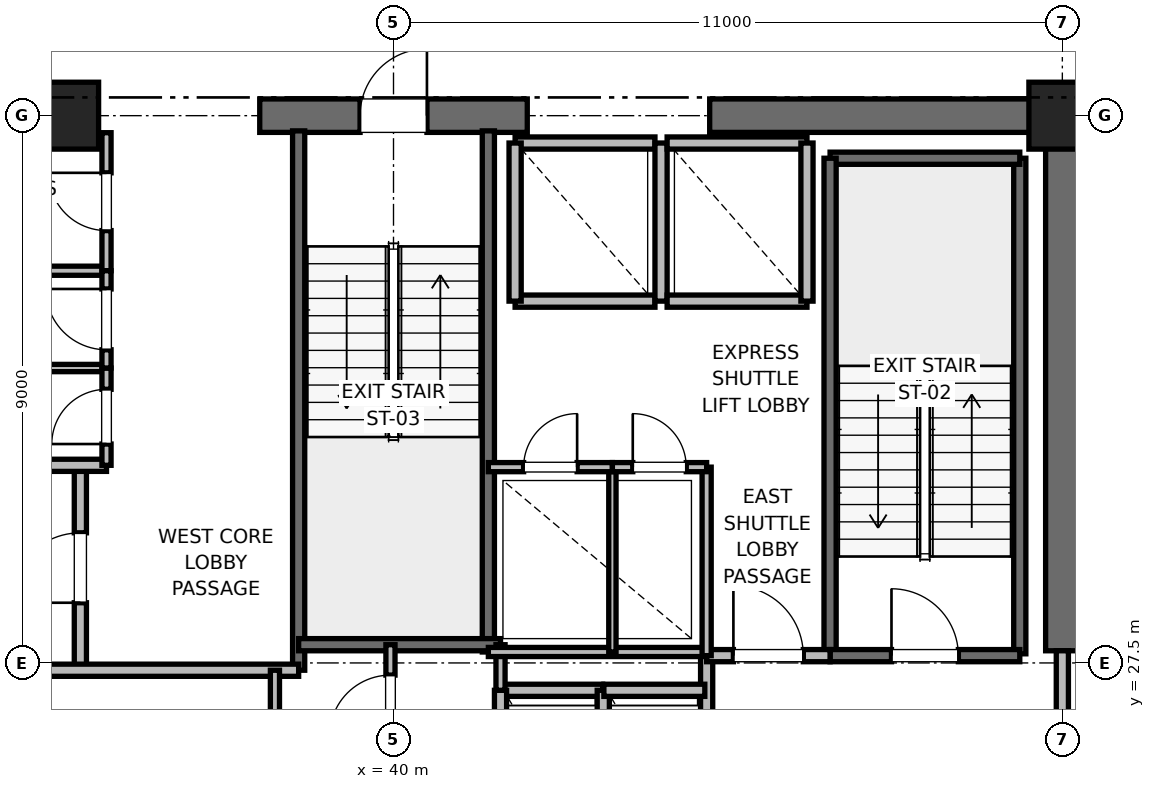
"""IFC4 building model, lengths in metres.
Left out: names, types, materials, properties, quantities, classifications, styles, units other than length and angle.
Written with IfcOpenShell. Run it as: python <this file> out.ifc"""

import sys

from ifc_helpers import new_model, si_unit, direction, frame, frame_2d, origin, origin_2d, place, context, subcontext, project, spatial, rectangle, extrude, element, fill, save


model = new_model("IFC4")
c1 = context("Model", 3, precision=1e-05, world=origin(), true_north=direction((0.0, 1.0)))
c2 = subcontext(c1, "Body", "Model", "MODEL_VIEW")
j1 = project(units=[si_unit("LENGTHUNIT", "METRE"), si_unit("PLANEANGLEUNIT", "RADIAN")], contexts=[c1])
p1 = place(None, origin())
s1 = spatial("IfcSite", under=j1, at=p1, CompositionType="ELEMENT")
p2 = place(p1, origin())
s2 = spatial("IfcBuilding", under=s1, at=p2, CompositionType="ELEMENT")
p3 = place(p2, frame((0.0, 0.0, 136.4)))
s3 = spatial("IfcBuildingStorey", under=s2, at=p3, CompositionType="ELEMENT", Elevation=136.4)
for number, where, z_axis, x_axis in (
    (1, (51.0, 36.5, 0.0), (0.0, 0.0, 1.0), (1.0, 0.0, 0.0)),
    (2, (34.6, 36.5, 0.0), (0.0, 0.0, 1.0), (1.0, 0.0, 0.0)),
):
    element("IfcColumn", number, at=place(p3, frame(where, z_axis=z_axis, x_axis=x_axis)), inside=s3, PredefinedType="PILASTER", context=c2, shape_type="SweptSolid", body=[
        extrude(rectangle(XDim=1.1, YDim=1.1, at=origin_2d()), origin(), (0.0, 0.0, 1.0), 4.0),
    ])
p4 = place(p3, frame((29.0, 36.5, 0.0), z_axis=(0.0, 0.0, 1.0), x_axis=(1.0, 0.0, 0.0)))
e3 = element("IfcWall", 3, at=p4, inside=s3, PredefinedType="SHEAR", context=c2, shape_type="SweptSolid", body=[
    extrude(rectangle(XDim=5.8, YDim=0.55, at=frame_2d((2.9, 0.0))), origin(), (0.0, 0.0, 1.0), 3.775),
])
p5 = place(p3, frame((37.8, 36.5, 0.0), z_axis=(0.0, 0.0, 1.0), x_axis=(1.0, 0.0, 0.0)))
e4 = element("IfcWall", 4, at=p5, inside=s3, PredefinedType="SHEAR", context=c2, shape_type="SweptSolid", body=[
    extrude(rectangle(XDim=4.4, YDim=0.55, at=frame_2d((2.2, 0.0))), origin(), (0.0, 0.0, 1.0), 3.775),
])
p6 = place(p5, frame((1.65, 0.0, 0.0)))
e5 = element("IfcOpeningElement", 5, at=p6, cuts=e4, PredefinedType="OPENING", context=c2, shape_type="SweptSolid", body=[
    extrude(rectangle(XDim=1.1, YDim=2.15, at=frame_2d((0.55, 1.075))), frame((0.0, 0.275, 0.0), z_axis=(0.0, -1.0, 0.0), x_axis=(1.0, 0.0, 0.0)), (0.0, 0.0, 1.0), 0.55),
])
p7 = place(p3, frame((45.2, 36.5, 0.0), z_axis=(0.0, 0.0, 1.0), x_axis=(1.0, 0.0, 0.0)))
e6 = element("IfcWall", 6, at=p7, inside=s3, PredefinedType="SHEAR", context=c2, shape_type="SweptSolid", body=[
    extrude(rectangle(XDim=5.8, YDim=0.55, at=frame_2d((2.9, 0.0))), origin(), (0.0, 0.0, 1.0), 3.775),
])
p8 = place(p3, frame((51.0, 27.7, 0.0), z_axis=(0.0, 0.0, 1.0), x_axis=(0.0, 1.0, 0.0)))
e7 = element("IfcWall", 7, at=p8, inside=s3, PredefinedType="SHEAR", context=c2, shape_type="SweptSolid", body=[
    extrude(rectangle(XDim=8.8, YDim=0.55, at=frame_2d((4.4, 0.0))), origin(), (0.0, 0.0, 1.0), 3.775),
])
p9 = place(p3, frame((50.3, 27.65, 0.0), z_axis=(0.0, 0.0, 1.0), x_axis=(0.0, 1.0, 0.0)))
e8 = element("IfcWall", 8, at=p9, inside=s3, PredefinedType="SOLIDWALL", context=c2, shape_type="SweptSolid", body=[
    extrude(rectangle(XDim=8.15, YDim=0.2, at=frame_2d((4.075, 0.0))), origin(), (0.0, 0.0, 1.0), 3.775),
])
p10 = place(p3, frame((47.18, 35.8, 0.0), z_axis=(0.0, 0.0, 1.0), x_axis=(1.0, 0.0, 0.0)))
e9 = element("IfcWall", 9, at=p10, inside=s3, PredefinedType="SOLIDWALL", context=c2, shape_type="SweptSolid", body=[
    extrude(rectangle(XDim=3.12, YDim=0.2, at=frame_2d((1.56, 0.0))), origin(), (0.0, 0.0, 1.0), 3.775),
])
p11 = place(p3, frame((47.18, 27.62, 0.0), z_axis=(0.0, 0.0, 1.0), x_axis=(0.0, 1.0, 0.0)))
e10 = element("IfcWall", 10, at=p11, inside=s3, PredefinedType="SOLIDWALL", context=c2, shape_type="SweptSolid", body=[
    extrude(rectangle(XDim=8.18, YDim=0.2, at=frame_2d((4.09, 0.0))), origin(), (0.0, 0.0, 1.0), 3.775),
])
p12 = place(p3, frame((47.18, 27.62, 0.0), z_axis=(0.0, 0.0, 1.0), x_axis=(1.0, 0.0, 0.0)))
e11 = element("IfcWall", 11, at=p12, inside=s3, PredefinedType="SOLIDWALL", context=c2, shape_type="SweptSolid", body=[
    extrude(rectangle(XDim=3.12, YDim=0.2, at=frame_2d((1.56, 0.0))), origin(), (0.0, 0.0, 1.0), 3.775),
])
p13 = place(p12, frame((1.01, 0.0, 0.0)))
e12 = element("IfcOpeningElement", 12, at=p13, cuts=e11, PredefinedType="OPENING", context=c2, shape_type="SweptSolid", body=[
    extrude(rectangle(XDim=1.1, YDim=2.15, at=frame_2d((0.55, 1.075))), frame((0.0, 0.1, 0.0), z_axis=(0.0, -1.0, 0.0), x_axis=(1.0, 0.0, 0.0)), (0.0, 0.0, 1.0), 0.2),
])
p14 = place(p3, frame((38.44, 27.38, 0.0), z_axis=(0.0, 0.0, 1.0), x_axis=(0.0, 1.0, 0.0)))
e13 = element("IfcWall", 13, at=p14, inside=s3, PredefinedType="SOLIDWALL", context=c2, shape_type="SweptSolid", body=[
    extrude(rectangle(XDim=8.87, YDim=0.2, at=frame_2d((4.435, 0.0))), origin(), (0.0, 0.0, 1.0), 3.775),
])
p15 = place(p3, frame((41.56, 27.68, 0.0), z_axis=(0.0, 0.0, 1.0), x_axis=(0.0, 1.0, 0.0)))
e14 = element("IfcWall", 14, at=p15, inside=s3, PredefinedType="SOLIDWALL", context=c2, shape_type="SweptSolid", body=[
    extrude(rectangle(XDim=8.57, YDim=0.2, at=frame_2d((4.285, 0.0))), origin(), (0.0, 0.0, 1.0), 3.775),
])
p16 = place(p3, frame((38.44, 27.8, 0.0), z_axis=(0.0, 0.0, 1.0), x_axis=(1.0, 0.0, 0.0)))
e15 = element("IfcWall", 15, at=p16, inside=s3, PredefinedType="SOLIDWALL", context=c2, shape_type="SweptSolid", body=[
    extrude(rectangle(XDim=3.32, YDim=0.2, at=frame_2d((1.66, 0.0))), origin(), (0.0, 0.0, 1.0), 3.775),
])
p17 = place(p3, frame((34.85, 27.38, 0.0), z_axis=(0.0, 0.0, 1.0), x_axis=(0.0, 1.0, 0.0)))
e16 = element("IfcWall", 16, at=p17, inside=s3, PredefinedType="PARTITIONING", context=c2, shape_type="SweptSolid", body=[
    extrude(rectangle(XDim=3.37, YDim=0.2, at=frame_2d((1.685, 0.0))), origin(), (0.0, 0.0, 1.0), 3.775),
])
p18 = place(p17, frame((1.11, 0.0, 0.0)))
e17 = element("IfcOpeningElement", 17, at=p18, cuts=e16, PredefinedType="OPENING", context=c2, shape_type="SweptSolid", body=[
    extrude(rectangle(XDim=1.15, YDim=2.2, at=frame_2d((0.575, 1.1))), frame((0.0, 0.1, 0.0), z_axis=(0.0, -1.0, 0.0), x_axis=(1.0, 0.0, 0.0)), (0.0, 0.0, 1.0), 0.2),
])
p19 = place(p3, frame((32.82, 27.38, 0.0), z_axis=(0.0, 0.0, 1.0), x_axis=(1.0, 0.0, 0.0)))
e18 = element("IfcWall", 18, at=p19, inside=s3, PredefinedType="PARTITIONING", context=c2, shape_type="SweptSolid", body=[
    extrude(rectangle(XDim=5.62, YDim=0.2, at=frame_2d((2.81, 0.0))), origin(), (0.0, 0.0, 1.0), 3.775),
])
p20 = place(p3, frame((32.15, 30.75, 0.0), z_axis=(0.0, 0.0, 1.0), x_axis=(1.0, 0.0, 0.0)))
e19 = element("IfcWall", 19, at=p20, inside=s3, PredefinedType="PARTITIONING", context=c2, shape_type="SweptSolid", body=[
    extrude(rectangle(XDim=3.13, YDim=0.2, at=frame_2d((1.565, 0.0))), origin(), (0.0, 0.0, 1.0), 3.775),
])
p21 = place(p3, frame((45.15, 24.25, 0.0), z_axis=(0.0, 0.0, 1.0), x_axis=(0.0, 1.0, 0.0)))
e20 = element("IfcWall", 20, at=p21, inside=s3, PredefinedType="PARTITIONING", context=c2, shape_type="SweptSolid", body=[
    extrude(rectangle(XDim=3.37, YDim=0.2, at=frame_2d((1.685, 0.0))), origin(), (0.0, 0.0, 1.0), 3.775),
])
p22 = place(p3, frame((45.15, 27.62, 0.0), z_axis=(0.0, 0.0, 1.0), x_axis=(1.0, 0.0, 0.0)))
e21 = element("IfcWall", 21, at=p22, inside=s3, PredefinedType="PARTITIONING", context=c2, shape_type="SweptSolid", body=[
    extrude(rectangle(XDim=2.03, YDim=0.2, at=frame_2d((1.015, 0.0))), origin(), (0.0, 0.0, 1.0), 3.775),
])
p23 = place(p22, frame((0.44, 0.0, 0.0)))
e22 = element("IfcOpeningElement", 22, at=p23, cuts=e21, PredefinedType="OPENING", context=c2, shape_type="SweptSolid", body=[
    extrude(rectangle(XDim=1.15, YDim=2.2, at=frame_2d((0.575, 1.1))), frame((0.0, 0.1, 0.0), z_axis=(0.0, -1.0, 0.0), x_axis=(1.0, 0.0, 0.0)), (0.0, 0.0, 1.0), 0.2),
])
p24 = place(p3, frame((51.0, 24.3, 0.0), z_axis=(0.0, 0.0, 1.0), x_axis=(0.0, 1.0, 0.0)))
e23 = element("IfcWall", 23, at=p24, inside=s3, PredefinedType="PARTITIONING", context=c2, shape_type="SweptSolid", body=[
    extrude(rectangle(XDim=3.4, YDim=0.2, at=frame_2d((1.7, 0.0))), origin(), (0.0, 0.0, 1.0), 2.755),
])
p25 = place(p24, frame((1.125, 0.0, 0.0)))
e24 = element("IfcOpeningElement", 24, at=p25, cuts=e23, PredefinedType="OPENING", context=c2, shape_type="SweptSolid", body=[
    extrude(rectangle(XDim=1.15, YDim=2.2, at=frame_2d((0.575, 1.1))), frame((0.0, 0.1, 0.0), z_axis=(0.0, -1.0, 0.0), x_axis=(1.0, 0.0, 0.0)), (0.0, 0.0, 1.0), 0.2),
])
p26 = place(p3, frame((43.44, 27.05, 0.0), z_axis=(0.0, 0.0, 1.0), x_axis=(-1.0, 0.0, 0.0)))
e25 = element("IfcWall", 25, at=p26, inside=s3, PredefinedType="SOLIDWALL", context=c2, shape_type="SweptSolid", body=[
    extrude(rectangle(XDim=1.68, YDim=0.2, at=frame_2d((0.84, 0.0))), origin(), (0.0, 0.0, 1.0), 3.775),
])
for number, where, z_axis, x_axis in (
    (26, (41.76, 27.05, 0.0), (0.0, 0.0, 1.0), (0.0, -1.0, 0.0)),
    (27, (43.45, 24.45, 0.0), (0.0, 0.0, 1.0), (0.0, 1.0, 0.0)),
):
    element("IfcWall", number, at=place(p3, frame(where, z_axis=z_axis, x_axis=x_axis)), inside=s3, PredefinedType="SOLIDWALL", context=c2, shape_type="SweptSolid", body=[
        extrude(rectangle(XDim=2.6, YDim=0.2, at=frame_2d((1.3, 0.0))), origin(), (0.0, 0.0, 1.0), 3.775),
    ])
p27 = place(p3, frame((45.12, 27.05, 0.0), z_axis=(0.0, 0.0, 1.0), x_axis=(-1.0, 0.0, 0.0)))
e28 = element("IfcWall", 28, at=p27, inside=s3, PredefinedType="SOLIDWALL", context=c2, shape_type="SweptSolid", body=[
    extrude(rectangle(XDim=1.66, YDim=0.2, at=frame_2d((0.83, 0.0))), origin(), (0.0, 0.0, 1.0), 3.775),
])
p28 = place(p3, frame((42.0, 33.45, 0.0), z_axis=(0.0, 0.0, 1.0), x_axis=(1.0, 0.0, 0.0)))
e29 = element("IfcWall", 29, at=p28, inside=s3, PredefinedType="SOLIDWALL", context=c2, shape_type="SweptSolid", body=[
    extrude(rectangle(XDim=2.3, YDim=0.2, at=frame_2d((1.15, 0.0))), origin(), (0.0, 0.0, 1.0), 3.775),
])
p29 = place(p3, frame((44.3, 36.05, 0.0), z_axis=(0.0, 0.0, 1.0), x_axis=(-1.0, 0.0, 0.0)))
e30 = element("IfcWall", 30, at=p29, inside=s3, PredefinedType="SOLIDWALL", context=c2, shape_type="SweptSolid", body=[
    extrude(rectangle(XDim=2.3, YDim=0.2, at=frame_2d((1.15, 0.0))), origin(), (0.0, 0.0, 1.0), 2.755),
])
for number, where, z_axis, x_axis in (
    (31, (42.0, 36.05, 0.0), (0.0, 0.0, 1.0), (0.0, -1.0, 0.0)),
    (32, (44.4, 33.45, 0.0), (0.0, 0.0, 1.0), (0.0, 1.0, 0.0)),
):
    element("IfcWall", number, at=place(p3, frame(where, z_axis=z_axis, x_axis=x_axis)), inside=s3, PredefinedType="SOLIDWALL", context=c2, shape_type="SweptSolid", body=[
        extrude(rectangle(XDim=2.6, YDim=0.2, at=frame_2d((1.3, 0.0))), origin(), (0.0, 0.0, 1.0), 2.755),
    ])
p30 = place(p3, frame((44.5, 33.45, 0.0), z_axis=(0.0, 0.0, 1.0), x_axis=(1.0, 0.0, 0.0)))
e33 = element("IfcWall", 33, at=p30, inside=s3, PredefinedType="SOLIDWALL", context=c2, shape_type="SweptSolid", body=[
    extrude(rectangle(XDim=2.3, YDim=0.2, at=frame_2d((1.15, 0.0))), origin(), (0.0, 0.0, 1.0), 3.775),
])
p31 = place(p3, frame((46.8, 36.05, 0.0), z_axis=(0.0, 0.0, 1.0), x_axis=(-1.0, 0.0, 0.0)))
e34 = element("IfcWall", 34, at=p31, inside=s3, PredefinedType="SOLIDWALL", context=c2, shape_type="SweptSolid", body=[
    extrude(rectangle(XDim=2.3, YDim=0.2, at=frame_2d((1.15, 0.0))), origin(), (0.0, 0.0, 1.0), 2.755),
])
p32 = place(p3, frame((46.8, 33.45, 0.0), z_axis=(0.0, 0.0, 1.0), x_axis=(0.0, 1.0, 0.0)))
e35 = element("IfcWall", 35, at=p32, inside=s3, PredefinedType="SOLIDWALL", context=c2, shape_type="SweptSolid", body=[
    extrude(rectangle(XDim=2.6, YDim=0.2, at=frame_2d((1.3, 0.0))), origin(), (0.0, 0.0, 1.0), 3.775),
])
p33 = place(p3, frame((41.76, 27.05, 0.0), z_axis=(0.0, 0.0, 1.0), x_axis=(0.0, 1.0, 0.0)))
e36 = element("IfcWall", 36, at=p33, inside=s3, PredefinedType="PARTITIONING", context=c2, shape_type="SweptSolid", body=[
    extrude(rectangle(XDim=0.75, YDim=0.15, at=frame_2d((0.375, 0.0))), origin(), (0.0, 0.0, 1.0), 2.85),
])
p34 = place(p3, frame((39.95, 25.8, 0.0), z_axis=(0.0, 0.0, 1.0), x_axis=(0.0, 1.0, 0.0)))
e37 = element("IfcWall", 37, at=p34, inside=s3, PredefinedType="PARTITIONING", context=c2, shape_type="SweptSolid", body=[
    extrude(rectangle(XDim=2.0, YDim=0.15, at=frame_2d((1.0, 0.0))), origin(), (0.0, 0.0, 1.0), 2.85),
])
p35 = place(p34, frame((0.5, 0.0, 0.0)))
e38 = element("IfcOpeningElement", 38, at=p35, cuts=e37, PredefinedType="OPENING", context=c2, shape_type="SweptSolid", body=[
    extrude(rectangle(XDim=1.0, YDim=2.15, at=frame_2d((0.5, 1.075))), frame((0.0, 0.075, 0.0), z_axis=(0.0, -1.0, 0.0), x_axis=(1.0, 0.0, 0.0)), (0.0, 0.0, 1.0), 0.15),
])
p36 = place(p3, frame((32.15, 33.95, 0.0), z_axis=(0.0, 0.0, 1.0), x_axis=(1.0, 0.0, 0.0)))
e39 = element("IfcWall", 39, at=p36, inside=s3, PredefinedType="PARTITIONING", context=c2, shape_type="SweptSolid", body=[
    extrude(rectangle(XDim=3.13, YDim=0.15, at=frame_2d((1.565, 0.0))), origin(), (0.0, 0.0, 1.0), 2.85),
])
p37 = place(p3, frame((35.28, 33.95, 0.0), z_axis=(0.0, 0.0, 1.0), x_axis=(0.0, 1.0, 0.0)))
e40 = element("IfcWall", 40, at=p37, inside=s3, PredefinedType="PARTITIONING", context=c2, shape_type="SweptSolid", body=[
    extrude(rectangle(XDim=2.27, YDim=0.15, at=frame_2d((1.135, 0.0))), origin(), (0.0, 0.0, 1.0), 2.755),
])
p38 = place(p37, frame((0.66, 0.0, 0.0)))
e41 = element("IfcOpeningElement", 41, at=p38, cuts=e40, PredefinedType="OPENING", context=c2, shape_type="SweptSolid", body=[
    extrude(rectangle(XDim=0.95, YDim=2.15, at=frame_2d((0.475, 1.075))), frame((0.0, 0.075, 0.0), z_axis=(0.0, -1.0, 0.0), x_axis=(1.0, 0.0, 0.0)), (0.0, 0.0, 1.0), 0.15),
])
p39 = place(p3, frame((32.15, 32.35, 0.0), z_axis=(0.0, 0.0, 1.0), x_axis=(1.0, 0.0, 0.0)))
e42 = element("IfcWall", 42, at=p39, inside=s3, PredefinedType="PARTITIONING", context=c2, shape_type="SweptSolid", body=[
    extrude(rectangle(XDim=3.13, YDim=0.12, at=frame_2d((1.565, 0.0))), origin(), (0.0, 0.0, 1.0), 2.85),
])
p40 = place(p3, frame((35.28, 30.75, 0.0), z_axis=(0.0, 0.0, 1.0), x_axis=(0.0, 1.0, 0.0)))
e43 = element("IfcWall", 43, at=p40, inside=s3, PredefinedType="PARTITIONING", context=c2, shape_type="SweptSolid", body=[
    extrude(rectangle(XDim=1.6, YDim=0.15, at=frame_2d((0.8, 0.0))), origin(), (0.0, 0.0, 1.0), 2.85),
])
p41 = place(p40, frame((0.35, 0.0, 0.0)))
e44 = element("IfcOpeningElement", 44, at=p41, cuts=e43, PredefinedType="OPENING", context=c2, shape_type="SweptSolid", body=[
    extrude(rectangle(XDim=0.9, YDim=2.1, at=frame_2d((0.45, 1.05))), frame((0.0, 0.075, 0.0), z_axis=(0.0, -1.0, 0.0), x_axis=(1.0, 0.0, 0.0)), (0.0, 0.0, 1.0), 0.15),
])
p42 = place(p3, frame((35.28, 32.35, 0.0), z_axis=(0.0, 0.0, 1.0), x_axis=(0.0, 1.0, 0.0)))
e45 = element("IfcWall", 45, at=p42, inside=s3, PredefinedType="PARTITIONING", context=c2, shape_type="SweptSolid", body=[
    extrude(rectangle(XDim=1.6, YDim=0.15, at=frame_2d((0.8, 0.0))), origin(), (0.0, 0.0, 1.0), 2.85),
])
p43 = place(p42, frame((0.3, 0.0, 0.0)))
e46 = element("IfcOpeningElement", 46, at=p43, cuts=e45, PredefinedType="OPENING", context=c2, shape_type="SweptSolid", body=[
    extrude(rectangle(XDim=1.0, YDim=2.15, at=frame_2d((0.5, 1.075))), frame((0.0, 0.075, 0.0), z_axis=(0.0, -1.0, 0.0), x_axis=(1.0, 0.0, 0.0)), (0.0, 0.0, 1.0), 0.15),
])
p44 = place(p3, frame((38.05, 24.5, 0.0), z_axis=(0.0, 0.0, 1.0), x_axis=(0.0, 1.0, 0.0)))
e47 = element("IfcWall", 47, at=p44, inside=s3, PredefinedType="PARTITIONING", context=c2, shape_type="SweptSolid", body=[
    extrude(rectangle(XDim=2.88, YDim=0.15, at=frame_2d((1.44, 0.0))), origin(), (0.0, 0.0, 1.0), 2.85),
])
p45 = place(p44, frame((0.94, 0.0, 0.0)))
e48 = element("IfcOpeningElement", 48, at=p45, cuts=e47, PredefinedType="OPENING", context=c2, shape_type="SweptSolid", body=[
    extrude(rectangle(XDim=1.0, YDim=2.15, at=frame_2d((0.5, 1.075))), frame((0.0, 0.075, 0.0), z_axis=(0.0, -1.0, 0.0), x_axis=(1.0, 0.0, 0.0)), (0.0, 0.0, 1.0), 0.15),
])
p46 = place(p3, frame((41.56, 27.68, 0.0), z_axis=(0.0, 0.0, 1.0), x_axis=(1.0, 0.0, 0.0)))
e49 = element("IfcWall", 49, at=p46, inside=s3, PredefinedType="PARTITIONING", context=c2, shape_type="SweptSolid", body=[
    extrude(rectangle(XDim=3.59, YDim=0.15, at=frame_2d((1.795, 0.0))), origin(), (0.0, 0.0, 1.0), 2.85),
])
p47 = place(p3, frame((45.15, 27.62, 0.0), z_axis=(0.0, 0.0, 1.0), x_axis=(0.0, 1.0, 0.0)))
e50 = element("IfcWall", 50, at=p47, inside=s3, PredefinedType="PARTITIONING", context=c2, shape_type="SweptSolid", body=[
    extrude(rectangle(XDim=3.1, YDim=0.15, at=frame_2d((1.55, 0.0))), origin(), (0.0, 0.0, 1.0), 2.85),
])
p48 = place(p3, frame((43.6, 27.68, 0.0), z_axis=(0.0, 0.0, 1.0), x_axis=(0.0, 1.0, 0.0)))
e51 = element("IfcWall", 51, at=p48, inside=s3, PredefinedType="PARTITIONING", context=c2, shape_type="SweptSolid", body=[
    extrude(rectangle(XDim=3.04, YDim=0.12, at=frame_2d((1.52, 0.0))), origin(), (0.0, 0.0, 1.0), 2.85),
])
p49 = place(p3, frame((41.56, 30.72, 0.0), z_axis=(0.0, 0.0, 1.0), x_axis=(1.0, 0.0, 0.0)))
e52 = element("IfcWall", 52, at=p49, inside=s3, PredefinedType="PARTITIONING", context=c2, shape_type="SweptSolid", body=[
    extrude(rectangle(XDim=2.04, YDim=0.15, at=frame_2d((1.02, 0.0))), origin(), (0.0, 0.0, 1.0), 2.85),
])
p50 = place(p49, frame((0.58, 0.0, 0.0)))
e53 = element("IfcOpeningElement", 53, at=p50, cuts=e52, PredefinedType="OPENING", context=c2, shape_type="SweptSolid", body=[
    extrude(rectangle(XDim=0.88, YDim=2.1, at=frame_2d((0.44, 1.05))), frame((0.0, 0.075, 0.0), z_axis=(0.0, -1.0, 0.0), x_axis=(1.0, 0.0, 0.0)), (0.0, 0.0, 1.0), 0.15),
])
p51 = place(p3, frame((43.6, 30.72, 0.0), z_axis=(0.0, 0.0, 1.0), x_axis=(1.0, 0.0, 0.0)))
e54 = element("IfcWall", 54, at=p51, inside=s3, PredefinedType="PARTITIONING", context=c2, shape_type="SweptSolid", body=[
    extrude(rectangle(XDim=1.55, YDim=0.15, at=frame_2d((0.775, 0.0))), origin(), (0.0, 0.0, 1.0), 2.85),
])
p52 = place(p51, frame((0.335, 0.0, 0.0)))
e55 = element("IfcOpeningElement", 55, at=p52, cuts=e54, PredefinedType="OPENING", context=c2, shape_type="SweptSolid", body=[
    extrude(rectangle(XDim=0.88, YDim=2.1, at=frame_2d((0.44, 1.05))), frame((0.0, 0.075, 0.0), z_axis=(0.0, -1.0, 0.0), x_axis=(1.0, 0.0, 0.0)), (0.0, 0.0, 1.0), 0.15),
])
p53 = place(p13, origin())
e56 = element("IfcDoor", 56, at=p53, inside=s3, OperationType="SINGLE_SWING_LEFT", PredefinedType="DOOR", context=c2, shape_type="SweptSolid", body=[
    extrude(rectangle(XDim=1.1, YDim=2.15, at=frame_2d((0.55, 1.075))), frame((0.0, 0.025, 0.0), z_axis=(0.0, -1.0, 0.0), x_axis=(1.0, 0.0, 0.0)), (0.0, 0.0, 1.0), 0.05),
])
fill(e12, e56)
p54 = place(p6, origin())
e57 = element("IfcDoor", 57, at=p54, inside=s3, OperationType="SINGLE_SWING_RIGHT", PredefinedType="DOOR", context=c2, shape_type="SweptSolid", body=[
    extrude(rectangle(XDim=1.1, YDim=2.15, at=frame_2d((0.55, 1.075))), frame((0.0, 0.025, 0.0), z_axis=(0.0, -1.0, 0.0), x_axis=(1.0, 0.0, 0.0)), (0.0, 0.0, 1.0), 0.05),
])
fill(e5, e57)
p55 = place(p18, origin())
e58 = element("IfcDoor", 58, at=p55, inside=s3, OperationType="SINGLE_SWING_LEFT", PredefinedType="DOOR", context=c2, shape_type="SweptSolid", body=[
    extrude(rectangle(XDim=1.15, YDim=2.2, at=frame_2d((0.575, 1.1))), frame((0.0, 0.025, 0.0), z_axis=(0.0, -1.0, 0.0), x_axis=(1.0, 0.0, 0.0)), (0.0, 0.0, 1.0), 0.05),
])
fill(e17, e58)
p56 = place(p23, origin())
e59 = element("IfcDoor", 59, at=p56, inside=s3, OperationType="SINGLE_SWING_LEFT", PredefinedType="DOOR", context=c2, shape_type="SweptSolid", body=[
    extrude(rectangle(XDim=1.15, YDim=2.2, at=frame_2d((0.575, 1.1))), frame((0.0, 0.025, 0.0), z_axis=(0.0, -1.0, 0.0), x_axis=(1.0, 0.0, 0.0)), (0.0, 0.0, 1.0), 0.05),
])
fill(e22, e59)
p57 = place(p35, origin())
e60 = element("IfcDoor", 60, at=p57, inside=s3, OperationType="SINGLE_SWING_LEFT", PredefinedType="DOOR", context=c2, shape_type="SweptSolid", body=[
    extrude(rectangle(XDim=1.0, YDim=2.15, at=frame_2d((0.5, 1.075))), frame((0.0, 0.025, 0.0), z_axis=(0.0, -1.0, 0.0), x_axis=(1.0, 0.0, 0.0)), (0.0, 0.0, 1.0), 0.05),
])
fill(e38, e60)
p58 = place(p38, origin())
e61 = element("IfcDoor", 61, at=p58, inside=s3, OperationType="SINGLE_SWING_RIGHT", PredefinedType="DOOR", context=c2, shape_type="SweptSolid", body=[
    extrude(rectangle(XDim=0.95, YDim=2.15, at=frame_2d((0.475, 1.075))), frame((0.0, 0.025, 0.0), z_axis=(0.0, -1.0, 0.0), x_axis=(1.0, 0.0, 0.0)), (0.0, 0.0, 1.0), 0.05),
])
fill(e41, e61)
p59 = place(p41, origin())
e62 = element("IfcDoor", 62, at=p59, inside=s3, OperationType="SINGLE_SWING_LEFT", PredefinedType="DOOR", context=c2, shape_type="SweptSolid", body=[
    extrude(rectangle(XDim=0.9, YDim=2.1, at=frame_2d((0.45, 1.05))), frame((0.0, 0.025, 0.0), z_axis=(0.0, -1.0, 0.0), x_axis=(1.0, 0.0, 0.0)), (0.0, 0.0, 1.0), 0.05),
])
fill(e44, e62)
p60 = place(p43, origin())
e63 = element("IfcDoor", 63, at=p60, inside=s3, OperationType="SINGLE_SWING_RIGHT", PredefinedType="DOOR", context=c2, shape_type="SweptSolid", body=[
    extrude(rectangle(XDim=1.0, YDim=2.15, at=frame_2d((0.5, 1.075))), frame((0.0, 0.025, 0.0), z_axis=(0.0, -1.0, 0.0), x_axis=(1.0, 0.0, 0.0)), (0.0, 0.0, 1.0), 0.05),
])
fill(e46, e63)
p61 = place(p50, origin())
e64 = element("IfcDoor", 64, at=p61, inside=s3, OperationType="SINGLE_SWING_RIGHT", PredefinedType="DOOR", context=c2, shape_type="SweptSolid", body=[
    extrude(rectangle(XDim=0.88, YDim=2.1, at=frame_2d((0.44, 1.05))), frame((0.0, 0.025, 0.0), z_axis=(0.0, -1.0, 0.0), x_axis=(1.0, 0.0, 0.0)), (0.0, 0.0, 1.0), 0.05),
])
fill(e53, e64)
p62 = place(p52, origin())
e65 = element("IfcDoor", 65, at=p62, inside=s3, OperationType="SINGLE_SWING_LEFT", PredefinedType="DOOR", context=c2, shape_type="SweptSolid", body=[
    extrude(rectangle(XDim=0.88, YDim=2.1, at=frame_2d((0.44, 1.05))), frame((0.0, 0.025, 0.0), z_axis=(0.0, -1.0, 0.0), x_axis=(1.0, 0.0, 0.0)), (0.0, 0.0, 1.0), 0.05),
])
fill(e55, e65)
save(model, sys.argv[1])
